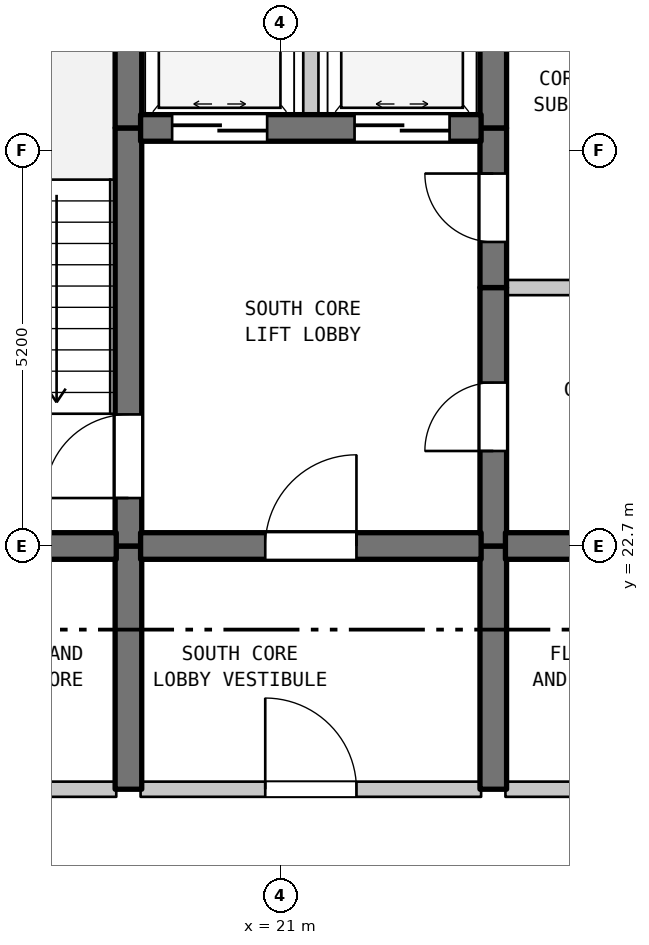
"""IFC4 building model, lengths in metres.
Left out: names, types, materials, properties, quantities, classifications, styles, units other than length and angle.
Written with IfcOpenShell. Run it as: python <this file> out.ifc"""

import sys

from ifc_helpers import new_model, si_unit, direction, frame, frame_2d, origin, place, context, subcontext, project, spatial, rectangle, extrude, element, fill, save


model = new_model("IFC4")
c1 = context("Model", 3, precision=1e-05, world=origin(), true_north=direction((0.0, 1.0)))
c2 = subcontext(c1, "Body", "Model", "MODEL_VIEW")
j1 = project(units=[si_unit("LENGTHUNIT", "METRE"), si_unit("PLANEANGLEUNIT", "RADIAN")], contexts=[c1])
p1 = place(None, origin())
s1 = spatial("IfcSite", under=j1, at=p1, CompositionType="ELEMENT")
p2 = place(p1, origin())
s2 = spatial("IfcBuilding", under=s1, at=p2, CompositionType="ELEMENT")
p3 = place(p2, frame((0.0, 0.0, 299.1)))
s3 = spatial("IfcBuildingStorey", under=s2, at=p3, CompositionType="ELEMENT", Elevation=299.1)
p4 = place(p3, frame((19.0, 19.5, 0.0), z_axis=(0.0, 0.0, 1.0), x_axis=(0.0, 1.0, 0.0)))
e1 = element("IfcWall", 1, at=p4, inside=s3, PredefinedType="SHEAR", context=c2, shape_type="SweptSolid", body=[
    extrude(rectangle(XDim=3.2, YDim=0.35, at=frame_2d((1.6, 0.0))), origin(), (0.0, 0.0, 1.0), 4.19),
])
p5 = place(p3, frame((19.0, 22.7, 0.0), z_axis=(0.0, 0.0, 1.0), x_axis=(0.0, 1.0, 0.0)))
e2 = element("IfcWall", 2, at=p5, inside=s3, PredefinedType="SHEAR", context=c2, shape_type="SweptSolid", body=[
    extrude(rectangle(XDim=5.5, YDim=0.35, at=frame_2d((2.75, 0.0))), origin(), (0.0, 0.0, 1.0), 4.19),
])
p6 = place(p5, frame((0.631, 0.0, 0.0)))
e3 = element("IfcOpeningElement", 3, at=p6, cuts=e2, PredefinedType="OPENING", context=c2, shape_type="SweptSolid", body=[
    extrude(rectangle(XDim=1.1, YDim=2.15, at=frame_2d((0.55, 1.075))), frame((0.0, 0.185, 0.0), z_axis=(0.0, -1.0, 0.0), x_axis=(1.0, 0.0, 0.0)), (0.0, 0.0, 1.0), 0.37),
])
p7 = place(p3, frame((19.0, 28.2, 0.0), z_axis=(0.0, 0.0, 1.0), x_axis=(0.0, 1.0, 0.0)))
e4 = element("IfcWall", 4, at=p7, inside=s3, PredefinedType="SHEAR", context=c2, shape_type="SweptSolid", body=[
    extrude(rectangle(XDim=1.3, YDim=0.35, at=frame_2d((0.65, 0.0))), origin(), (0.0, 0.0, 1.0), 4.19),
])
p8 = place(p3, frame((21.4, 28.2, 0.0), z_axis=(0.0, 0.0, 1.0), x_axis=(0.0, 1.0, 0.0)))
e5 = element("IfcWall", 5, at=p8, inside=s3, PredefinedType="STANDARD", context=c2, shape_type="SweptSolid", body=[
    extrude(rectangle(XDim=2.6, YDim=0.2, at=frame_2d((1.3, 0.0))), origin(), (0.0, 0.0, 1.0), 4.19),
])
p9 = place(p3, frame((23.8, 19.5, 0.0), z_axis=(0.0, 0.0, 1.0), x_axis=(0.0, 1.0, 0.0)))
e6 = element("IfcWall", 6, at=p9, inside=s3, PredefinedType="SHEAR", context=c2, shape_type="SweptSolid", body=[
    extrude(rectangle(XDim=3.2, YDim=0.35, at=frame_2d((1.6, 0.0))), origin(), (0.0, 0.0, 1.0), 4.19),
])
p10 = place(p3, frame((23.8, 22.7, 0.0), z_axis=(0.0, 0.0, 1.0), x_axis=(0.0, 1.0, 0.0)))
e7 = element("IfcWall", 7, at=p10, inside=s3, PredefinedType="SHEAR", context=c2, shape_type="SweptSolid", body=[
    extrude(rectangle(XDim=3.4, YDim=0.35, at=frame_2d((1.7, 0.0))), origin(), (0.0, 0.0, 1.0), 4.19),
])
p11 = place(p10, frame((1.25, 0.0, 0.0)))
e8 = element("IfcOpeningElement", 8, at=p11, cuts=e7, PredefinedType="OPENING", context=c2, shape_type="SweptSolid", body=[
    extrude(rectangle(XDim=0.9, YDim=2.15, at=frame_2d((0.45, 1.075))), frame((0.0, 0.185, 0.0), z_axis=(0.0, -1.0, 0.0), x_axis=(1.0, 0.0, 0.0)), (0.0, 0.0, 1.0), 0.37),
])
p12 = place(p3, frame((23.8, 26.1, 0.0), z_axis=(0.0, 0.0, 1.0), x_axis=(0.0, 1.0, 0.0)))
e9 = element("IfcWall", 9, at=p12, inside=s3, PredefinedType="SHEAR", context=c2, shape_type="SweptSolid", body=[
    extrude(rectangle(XDim=2.1, YDim=0.35, at=frame_2d((1.05, 0.0))), origin(), (0.0, 0.0, 1.0), 4.19),
])
p13 = place(p12, frame((0.6, 0.0, 0.0)))
e10 = element("IfcOpeningElement", 10, at=p13, cuts=e9, PredefinedType="OPENING", context=c2, shape_type="SweptSolid", body=[
    extrude(rectangle(XDim=0.9, YDim=2.15, at=frame_2d((0.45, 1.075))), frame((0.0, 0.185, 0.0), z_axis=(0.0, -1.0, 0.0), x_axis=(1.0, 0.0, 0.0)), (0.0, 0.0, 1.0), 0.37),
])
p14 = place(p3, frame((23.8, 28.2, 0.0), z_axis=(0.0, 0.0, 1.0), x_axis=(0.0, 1.0, 0.0)))
e11 = element("IfcWall", 11, at=p14, inside=s3, PredefinedType="SHEAR", context=c2, shape_type="SweptSolid", body=[
    extrude(rectangle(XDim=2.6, YDim=0.35, at=frame_2d((1.3, 0.0))), origin(), (0.0, 0.0, 1.0), 4.19),
])
p15 = place(p3, frame((15.16, 19.5, 0.0), z_axis=(0.0, 0.0, 1.0), x_axis=(1.0, 0.0, 0.0)))
e12 = element("IfcWall", 12, at=p15, inside=s3, PredefinedType="STANDARD", context=c2, shape_type="SweptSolid", body=[
    extrude(rectangle(XDim=3.68, YDim=0.2, at=frame_2d((1.84, 0.0))), origin(), (0.0, 0.0, 1.0), 4.19),
])
p16 = place(p15, frame((1.39, 0.0, 0.0)))
e13 = element("IfcOpeningElement", 13, at=p16, cuts=e12, PredefinedType="OPENING", context=c2, shape_type="SweptSolid", body=[
    extrude(rectangle(XDim=0.9, YDim=2.15, at=frame_2d((0.45, 1.075))), frame((0.0, 0.11, 0.0), z_axis=(0.0, -1.0, 0.0), x_axis=(1.0, 0.0, 0.0)), (0.0, 0.0, 1.0), 0.22),
])
p17 = place(p3, frame((19.16, 19.5, 0.0), z_axis=(0.0, 0.0, 1.0), x_axis=(1.0, 0.0, 0.0)))
e14 = element("IfcWall", 14, at=p17, inside=s3, PredefinedType="STANDARD", context=c2, shape_type="SweptSolid", body=[
    extrude(rectangle(XDim=4.48, YDim=0.2, at=frame_2d((2.24, 0.0))), origin(), (0.0, 0.0, 1.0), 4.19),
])
p18 = place(p17, frame((1.64, 0.0, 0.0)))
e15 = element("IfcOpeningElement", 15, at=p18, cuts=e14, PredefinedType="OPENING", context=c2, shape_type="SweptSolid", body=[
    extrude(rectangle(XDim=1.2, YDim=2.2, at=frame_2d((0.6, 1.1))), frame((0.0, 0.11, 0.0), z_axis=(0.0, -1.0, 0.0), x_axis=(1.0, 0.0, 0.0)), (0.0, 0.0, 1.0), 0.22),
])
p19 = place(p3, frame((23.96, 19.5, 0.0), z_axis=(0.0, 0.0, 1.0), x_axis=(1.0, 0.0, 0.0)))
e16 = element("IfcWall", 16, at=p19, inside=s3, PredefinedType="STANDARD", context=c2, shape_type="SweptSolid", body=[
    extrude(rectangle(XDim=3.155, YDim=0.2, at=frame_2d((1.578, 0.0))), origin(), (0.0, 0.0, 1.0), 4.19),
])
p20 = place(p19, frame((0.991, 0.0, 0.0)))
e17 = element("IfcOpeningElement", 17, at=p20, cuts=e16, PredefinedType="OPENING", context=c2, shape_type="SweptSolid", body=[
    extrude(rectangle(XDim=0.95, YDim=2.15, at=frame_2d((0.475, 1.075))), frame((0.0, 0.11, 0.0), z_axis=(0.0, -1.0, 0.0), x_axis=(1.0, 0.0, 0.0)), (0.0, 0.0, 1.0), 0.22),
])
p21 = place(p3, frame((15.16, 22.7, 0.0), z_axis=(0.0, 0.0, 1.0), x_axis=(1.0, 0.0, 0.0)))
e18 = element("IfcWall", 18, at=p21, inside=s3, PredefinedType="SHEAR", context=c2, shape_type="SweptSolid", body=[
    extrude(rectangle(XDim=3.68, YDim=0.35, at=frame_2d((1.84, 0.0))), origin(), (0.0, 0.0, 1.0), 4.19),
])
p22 = place(p3, frame((19.16, 22.7, 0.0), z_axis=(0.0, 0.0, 1.0), x_axis=(1.0, 0.0, 0.0)))
e19 = element("IfcWall", 19, at=p22, inside=s3, PredefinedType="SHEAR", context=c2, shape_type="SweptSolid", body=[
    extrude(rectangle(XDim=4.48, YDim=0.35, at=frame_2d((2.24, 0.0))), origin(), (0.0, 0.0, 1.0), 4.19),
])
p23 = place(p22, frame((1.64, 0.0, 0.0)))
e20 = element("IfcOpeningElement", 20, at=p23, cuts=e19, PredefinedType="OPENING", context=c2, shape_type="SweptSolid", body=[
    extrude(rectangle(XDim=1.2, YDim=2.2, at=frame_2d((0.6, 1.1))), frame((0.0, 0.185, 0.0), z_axis=(0.0, -1.0, 0.0), x_axis=(1.0, 0.0, 0.0)), (0.0, 0.0, 1.0), 0.37),
])
p24 = place(p3, frame((23.96, 22.7, 0.0), z_axis=(0.0, 0.0, 1.0), x_axis=(1.0, 0.0, 0.0)))
e21 = element("IfcWall", 21, at=p24, inside=s3, PredefinedType="SHEAR", context=c2, shape_type="SweptSolid", body=[
    extrude(rectangle(XDim=3.155, YDim=0.35, at=frame_2d((1.578, 0.0))), origin(), (0.0, 0.0, 1.0), 4.19),
])
p25 = place(p3, frame((23.96, 26.1, 0.0), z_axis=(0.0, 0.0, 1.0), x_axis=(1.0, 0.0, 0.0)))
e22 = element("IfcWall", 22, at=p25, inside=s3, PredefinedType="STANDARD", context=c2, shape_type="SweptSolid", body=[
    extrude(rectangle(XDim=3.18, YDim=0.2, at=frame_2d((1.59, 0.0))), origin(), (0.0, 0.0, 1.0), 4.19),
])
p26 = place(p3, frame((19.16, 28.2, 0.0), z_axis=(0.0, 0.0, 1.0), x_axis=(1.0, 0.0, 0.0)))
e23 = element("IfcWall", 23, at=p26, inside=s3, PredefinedType="SHEAR", context=c2, shape_type="SweptSolid", body=[
    extrude(rectangle(XDim=4.48, YDim=0.35, at=frame_2d((2.24, 0.0))), origin(), (0.0, 0.0, 1.0), 4.19),
])
p27 = place(p26, frame((0.415, 0.0, 0.0)))
e24 = element("IfcOpeningElement", 24, at=p27, cuts=e23, PredefinedType="OPENING", context=c2, shape_type="SweptSolid", body=[
    extrude(rectangle(XDim=1.25, YDim=2.2, at=frame_2d((0.625, 1.1))), frame((0.0, 0.185, 0.0), z_axis=(0.0, -1.0, 0.0), x_axis=(1.0, 0.0, 0.0)), (0.0, 0.0, 1.0), 0.37),
])
p28 = place(p26, frame((2.815, 0.0, 0.0)))
e25 = element("IfcOpeningElement", 25, at=p28, cuts=e23, PredefinedType="OPENING", context=c2, shape_type="SweptSolid", body=[
    extrude(rectangle(XDim=1.25, YDim=2.2, at=frame_2d((0.625, 1.1))), frame((0.0, 0.185, 0.0), z_axis=(0.0, -1.0, 0.0), x_axis=(1.0, 0.0, 0.0)), (0.0, 0.0, 1.0), 0.37),
])
p29 = place(p6, origin())
e26 = element("IfcDoor", 26, at=p29, inside=s3, OperationType="SINGLE_SWING_LEFT", PredefinedType="DOOR", context=c2, shape_type="SweptSolid", body=[
    extrude(rectangle(XDim=1.1, YDim=2.15, at=frame_2d((0.55, 1.075))), frame((0.0, 0.025, 0.0), z_axis=(0.0, -1.0, 0.0), x_axis=(1.0, 0.0, 0.0)), (0.0, 0.0, 1.0), 0.05),
])
fill(e3, e26)
p30 = place(p11, origin())
e27 = element("IfcDoor", 27, at=p30, inside=s3, OperationType="SINGLE_SWING_LEFT", PredefinedType="DOOR", context=c2, shape_type="SweptSolid", body=[
    extrude(rectangle(XDim=0.9, YDim=2.15, at=frame_2d((0.45, 1.075))), frame((0.0, 0.025, 0.0), z_axis=(0.0, -1.0, 0.0), x_axis=(1.0, 0.0, 0.0)), (0.0, 0.0, 1.0), 0.05),
])
fill(e8, e27)
p31 = place(p13, origin())
e28 = element("IfcDoor", 28, at=p31, inside=s3, OperationType="SINGLE_SWING_RIGHT", PredefinedType="DOOR", context=c2, shape_type="SweptSolid", body=[
    extrude(rectangle(XDim=0.9, YDim=2.15, at=frame_2d((0.45, 1.075))), frame((0.0, 0.025, 0.0), z_axis=(0.0, -1.0, 0.0), x_axis=(1.0, 0.0, 0.0)), (0.0, 0.0, 1.0), 0.05),
])
fill(e10, e28)
p32 = place(p18, origin())
e29 = element("IfcDoor", 29, at=p32, inside=s3, OperationType="SINGLE_SWING_LEFT", PredefinedType="DOOR", context=c2, shape_type="SweptSolid", body=[
    extrude(rectangle(XDim=1.2, YDim=2.2, at=frame_2d((0.6, 1.1))), frame((0.0, 0.025, 0.0), z_axis=(0.0, -1.0, 0.0), x_axis=(1.0, 0.0, 0.0)), (0.0, 0.0, 1.0), 0.05),
])
fill(e15, e29)
p33 = place(p23, origin())
e30 = element("IfcDoor", 30, at=p33, inside=s3, OperationType="SINGLE_SWING_RIGHT", PredefinedType="DOOR", context=c2, shape_type="SweptSolid", body=[
    extrude(rectangle(XDim=1.2, YDim=2.2, at=frame_2d((0.6, 1.1))), frame((0.0, 0.025, 0.0), z_axis=(0.0, -1.0, 0.0), x_axis=(1.0, 0.0, 0.0)), (0.0, 0.0, 1.0), 0.05),
])
fill(e20, e30)
p34 = place(p27, origin())
e31 = element("IfcDoor", 31, at=p34, inside=s3, OperationType="DOUBLE_DOOR_SLIDING", PredefinedType="DOOR", context=c2, shape_type="SweptSolid", body=[
    extrude(rectangle(XDim=1.25, YDim=2.2, at=frame_2d((0.625, 1.1))), frame((0.0, 0.025, 0.0), z_axis=(0.0, -1.0, 0.0), x_axis=(1.0, 0.0, 0.0)), (0.0, 0.0, 1.0), 0.05),
])
fill(e24, e31)
p35 = place(p28, origin())
e32 = element("IfcDoor", 32, at=p35, inside=s3, OperationType="DOUBLE_DOOR_SLIDING", PredefinedType="DOOR", context=c2, shape_type="SweptSolid", body=[
    extrude(rectangle(XDim=1.25, YDim=2.2, at=frame_2d((0.625, 1.1))), frame((0.0, 0.025, 0.0), z_axis=(0.0, -1.0, 0.0), x_axis=(1.0, 0.0, 0.0)), (0.0, 0.0, 1.0), 0.05),
])
fill(e25, e32)
save(model, sys.argv[1])
